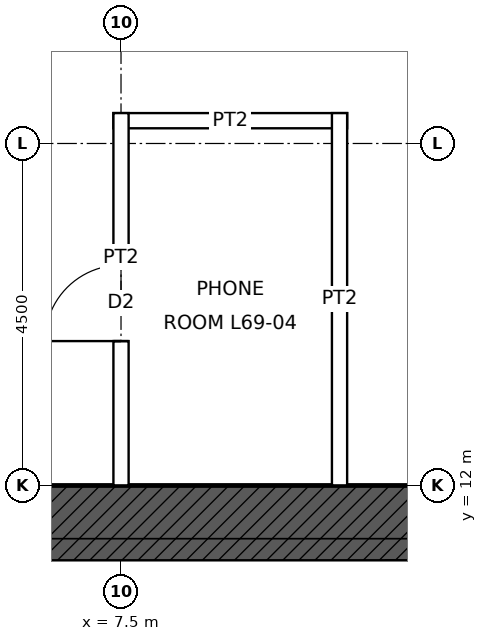
"""IFC4 building model, lengths in metres.
Left out: names, types, materials, properties, quantities, classifications, styles, units other than length and angle.
Written with IfcOpenShell. Run it as: python <this file> out.ifc"""

import sys

from ifc_helpers import new_model, si_unit, direction, frame, frame_2d, origin, place, context, subcontext, project, spatial, rectangle, extrude, element, fill, save


model = new_model("IFC4")
c1 = context("Model", 3, precision=1e-05, world=origin(), true_north=direction((0.0, 1.0)))
c2 = subcontext(c1, "Body", "Model", "MODEL_VIEW")
j1 = project(units=[si_unit("LENGTHUNIT", "METRE"), si_unit("PLANEANGLEUNIT", "RADIAN")], contexts=[c1])
p1 = place(None, origin())
s1 = spatial("IfcSite", under=j1, at=p1, CompositionType="ELEMENT")
p2 = place(p1, origin())
s2 = spatial("IfcBuilding", under=s1, at=p2, CompositionType="ELEMENT")
p3 = place(p2, frame((0.0, 0.0, 311.9)))
s3 = spatial("IfcBuildingStorey", under=s2, at=p3, CompositionType="ELEMENT", Elevation=311.9)
p4 = place(p3, frame((-12.0, 11.5, 0.0), z_axis=(0.0, 0.0, 1.0), x_axis=(1.0, 0.0, 0.0)))
e1 = element("IfcWall", 1, at=p4, inside=s3, PredefinedType="SHEAR", context=c2, shape_type="SweptSolid", body=[
    extrude(rectangle(XDim=24.0, YDim=1.0, at=frame_2d((12.0, 0.0))), origin(), (0.0, 0.0, 1.0), 4.0),
])
p5 = place(p4, frame((6.25, 0.0, 0.0)))
e2 = element("IfcOpeningElement", 2, at=p5, cuts=e1, PredefinedType="OPENING", context=c2, shape_type="SweptSolid", body=[
    extrude(rectangle(XDim=1.0, YDim=2.4, at=frame_2d((0.5, 1.2))), frame((0.0, 0.51, 0.0), z_axis=(0.0, -1.0, 0.0), x_axis=(1.0, 0.0, 0.0)), (0.0, 0.0, 1.0), 1.02),
])
p6 = place(p4, frame((16.75, 0.0, 0.0)))
e3 = element("IfcOpeningElement", 3, at=p6, cuts=e1, PredefinedType="OPENING", context=c2, shape_type="SweptSolid", body=[
    extrude(rectangle(XDim=1.0, YDim=2.4, at=frame_2d((0.5, 1.2))), frame((0.0, 0.51, 0.0), z_axis=(0.0, -1.0, 0.0), x_axis=(1.0, 0.0, 0.0)), (0.0, 0.0, 1.0), 1.02),
])
p7 = place(p3, frame((7.4, 16.8, 0.0), z_axis=(0.0, 0.0, 1.0), x_axis=(1.0, 0.0, 0.0)))
e4 = element("IfcWall", 4, at=p7, inside=s3, PredefinedType="PARTITIONING", context=c2, shape_type="SweptSolid", body=[
    extrude(rectangle(XDim=3.075, YDim=0.2, at=frame_2d((1.538, 0.0))), origin(), (0.0, 0.0, 1.0), 3.85),
])
p8 = place(p3, frame((7.5, 12.0, 0.0), z_axis=(0.0, 0.0, 1.0), x_axis=(0.0, 1.0, 0.0)))
e5 = element("IfcWall", 5, at=p8, inside=s3, PredefinedType="PARTITIONING", context=c2, shape_type="SweptSolid", body=[
    extrude(rectangle(XDim=4.9, YDim=0.2, at=frame_2d((2.45, 0.0))), origin(), (0.0, 0.0, 1.0), 3.243),
])
p9 = place(p8, frame((1.9, 0.0, 0.0)))
e6 = element("IfcOpeningElement", 6, at=p9, cuts=e5, PredefinedType="OPENING", context=c2, shape_type="SweptSolid", body=[
    extrude(rectangle(XDim=1.0, YDim=2.1, at=frame_2d((0.5, 1.05))), frame((0.0, 0.11, 0.0), z_axis=(0.0, -1.0, 0.0), x_axis=(1.0, 0.0, 0.0)), (0.0, 0.0, 1.0), 0.22),
])
p10 = place(p3, frame((10.375, 12.0, 0.0), z_axis=(0.0, 0.0, 1.0), x_axis=(0.0, 1.0, 0.0)))
e7 = element("IfcWall", 7, at=p10, inside=s3, PredefinedType="PARTITIONING", context=c2, shape_type="SweptSolid", body=[
    extrude(rectangle(XDim=4.9, YDim=0.2, at=frame_2d((2.45, 0.0))), origin(), (0.0, 0.0, 1.0), 3.85),
])
p11 = place(p9, origin())
e8 = element("IfcDoor", 8, at=p11, inside=s3, OperationType="SINGLE_SWING_LEFT", PredefinedType="DOOR", context=c2, shape_type="SweptSolid", body=[
    extrude(rectangle(XDim=1.0, YDim=2.1, at=frame_2d((0.5, 1.05))), frame((0.0, 0.025, 0.0), z_axis=(0.0, -1.0, 0.0), x_axis=(1.0, 0.0, 0.0)), (0.0, 0.0, 1.0), 0.05),
])
fill(e6, e8)
save(model, sys.argv[1])
